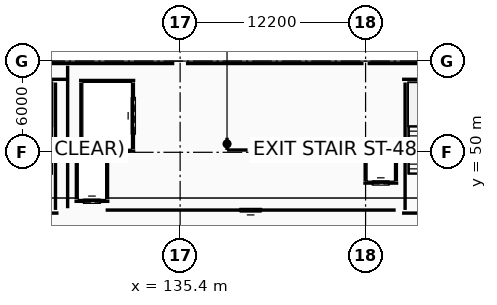
"""IFC4 building model, lengths in metres.
Left out: names, types, materials, properties, quantities, classifications, styles, units other than length and angle.
Written with IfcOpenShell. Run it as: python <this file> out.ifc"""

import sys

from ifc_helpers import new_model, si_unit, direction, frame, frame_2d, origin, origin_2d, place, context, subcontext, project, spatial, rectangle, i_section, extrude, element, fill, save


model = new_model("IFC4")
c1 = context("Model", 3, precision=1e-05, world=origin(), true_north=direction((0.0, 1.0)))
c2 = subcontext(c1, "Body", "Model", "MODEL_VIEW")
j1 = project(units=[si_unit("LENGTHUNIT", "METRE"), si_unit("PLANEANGLEUNIT", "RADIAN")], contexts=[c1])
p1 = place(None, origin())
s1 = spatial("IfcSite", under=j1, at=p1, CompositionType="ELEMENT")
p2 = place(p1, origin())
s2 = spatial("IfcBuilding", under=s1, at=p2, CompositionType="ELEMENT")
p3 = place(p2, frame((0.0, 0.0, 15.0)))
s3 = spatial("IfcBuildingStorey", under=s2, at=p3, CompositionType="ELEMENT", Elevation=15.0)
for number, where, z_axis, x_axis in (
    (1, (135.4, 50.0, 0.0), (0.0, 0.0, 1.0), (1.0, 0.0, 0.0)),
    (2, (135.4, 56.0, 0.0), (0.0, 0.0, 1.0), (1.0, 0.0, 0.0)),
):
    element("IfcColumn", number, at=place(p3, frame(where, z_axis=z_axis, x_axis=x_axis)), inside=s3, PredefinedType="COLUMN", context=c2, shape_type="SweptSolid", body=[
        extrude(rectangle(XDim=0.75, YDim=0.75, at=origin_2d()), origin(), (0.0, 0.0, 1.0), 4.8),
    ])
p4 = place(p3, frame((147.6, 56.0, 0.0), z_axis=(0.0, 0.0, 1.0), x_axis=(1.0, 0.0, 0.0)))
e3 = element("IfcColumn", 3, at=p4, inside=s3, PredefinedType="COLUMN", context=c2, shape_type="SweptSolid", body=[
    extrude(i_section(OverallWidth=0.25, OverallDepth=0.4, WebThickness=0.01, FlangeThickness=0.013, FilletRadius=0.014, at=origin_2d()), origin(), (0.0, 0.0, 1.0), 4.8),
])
p5 = place(p3, frame((126.783, 55.84, 0.0), z_axis=(0.0, 0.0, 1.0), x_axis=(1.0, 0.0, 0.0)))
e4 = element("IfcWall", 4, at=p5, inside=s3, PredefinedType="STANDARD", context=c2, shape_type="SweptSolid", body=[
    extrude(rectangle(XDim=8.234, YDim=0.28, at=frame_2d((4.117, 0.0))), origin(), (0.0, 0.0, 1.0), 4.075),
])
p6 = place(p5, frame((3.492, 0.0, 0.95)))
e5 = element("IfcOpeningElement", 5, at=p6, cuts=e4, PredefinedType="OPENING", context=c2, shape_type="SweptSolid", body=[
    extrude(rectangle(XDim=1.25, YDim=1.8, at=frame_2d((0.625, 0.9))), frame((0.0, 0.15, 0.0), z_axis=(0.0, -1.0, 0.0), x_axis=(1.0, 0.0, 0.0)), (0.0, 0.0, 1.0), 0.3),
])
p7 = place(p3, frame((135.783, 55.84, 0.0), z_axis=(0.0, 0.0, 1.0), x_axis=(1.0, 0.0, 0.0)))
e6 = element("IfcWall", 6, at=p7, inside=s3, PredefinedType="STANDARD", context=c2, shape_type="SweptSolid", body=[
    extrude(rectangle(XDim=11.684, YDim=0.28, at=frame_2d((5.842, 0.0))), origin(), (0.0, 0.0, 1.0), 3.925),
])
p8 = place(p7, frame((5.217, 0.0, 0.95)))
e7 = element("IfcOpeningElement", 7, at=p8, cuts=e6, PredefinedType="OPENING", context=c2, shape_type="SweptSolid", body=[
    extrude(rectangle(XDim=1.25, YDim=2.1, at=frame_2d((0.625, 1.05))), frame((0.0, 0.15, 0.0), z_axis=(0.0, -1.0, 0.0), x_axis=(1.0, 0.0, 0.0)), (0.0, 0.0, 1.0), 0.3),
])
p9 = place(p3, frame((147.733, 55.84, 0.0), z_axis=(0.0, 0.0, 1.0), x_axis=(1.0, 0.0, 0.0)))
e8 = element("IfcWall", 8, at=p9, inside=s3, PredefinedType="STANDARD", context=c2, shape_type="SweptSolid", body=[
    extrude(rectangle(XDim=11.943, YDim=0.28, at=frame_2d((5.972, 0.0))), origin(), (0.0, 0.0, 1.0), 3.985),
])
p10 = place(p9, frame((5.259, 0.0, 0.95)))
e9 = element("IfcOpeningElement", 9, at=p10, cuts=e8, PredefinedType="OPENING", context=c2, shape_type="SweptSolid", body=[
    extrude(rectangle(XDim=1.4, YDim=1.2, at=frame_2d((0.7, 0.6))), frame((0.0, 0.15, 0.0), z_axis=(0.0, -1.0, 0.0), x_axis=(1.0, 0.0, 0.0)), (0.0, 0.0, 1.0), 0.3),
])
p11 = place(p3, frame((119.0, 46.0, 0.0), z_axis=(0.0, 0.0, 1.0), x_axis=(1.0, 0.0, 0.0)))
e10 = element("IfcWall", 10, at=p11, inside=s3, PredefinedType="SHEAR", context=c2, shape_type="SweptSolid", body=[
    extrude(rectangle(XDim=8.4, YDim=0.4, at=frame_2d((4.2, 0.0))), origin(), (0.0, 0.0, 1.0), 4.55),
])
p12 = place(p11, frame((3.55, 0.0, 0.0)))
e11 = element("IfcOpeningElement", 11, at=p12, cuts=e10, PredefinedType="OPENING", context=c2, shape_type="SweptSolid", body=[
    extrude(rectangle(XDim=1.3, YDim=2.15, at=frame_2d((0.65, 1.075))), frame((0.0, 0.21, 0.0), z_axis=(0.0, -1.0, 0.0), x_axis=(1.0, 0.0, 0.0)), (0.0, 0.0, 1.0), 0.42),
])
p13 = place(p3, frame((127.896, 54.8, 0.0), z_axis=(0.0, 0.0, 1.0), x_axis=(-1.0, 0.0, 0.0)))
e12 = element("IfcWall", 12, at=p13, inside=s3, PredefinedType="SHEAR", context=c2, shape_type="SweptSolid", body=[
    extrude(rectangle(XDim=8.952, YDim=0.4, at=frame_2d((4.476, 0.0))), origin(), (0.0, 0.0, 1.0), 4.55),
])
p14 = place(p3, frame((127.2, 46.21, 0.0), z_axis=(0.0, 0.0, 1.0), x_axis=(0.0, 1.0, 0.0)))
e13 = element("IfcWall", 13, at=p14, inside=s3, PredefinedType="SHEAR", context=c2, shape_type="SweptSolid", body=[
    extrude(rectangle(XDim=8.38, YDim=0.4, at=frame_2d((4.19, 0.0))), origin(), (0.0, 0.0, 1.0), 4.55),
])
p15 = place(p3, frame((128.45, 46.775, 0.0), z_axis=(0.0, 0.0, 1.0), x_axis=(1.0, 0.0, 0.0)))
e14 = element("IfcWall", 14, at=p15, inside=s3, PredefinedType="STANDARD", context=c2, shape_type="SweptSolid", body=[
    extrude(rectangle(XDim=2.3, YDim=0.25, at=frame_2d((1.15, 0.0))), origin(), (0.0, 0.0, 1.0), 4.53),
])
p16 = place(p15, frame((0.6, 0.0, 0.0)))
e15 = element("IfcOpeningElement", 15, at=p16, cuts=e14, PredefinedType="OPENING", context=c2, shape_type="SweptSolid", body=[
    extrude(rectangle(XDim=1.1, YDim=2.15, at=frame_2d((0.55, 1.075))), frame((0.0, 0.135, 0.0), z_axis=(0.0, -1.0, 0.0), x_axis=(1.0, 0.0, 0.0)), (0.0, 0.0, 1.0), 0.27),
])
p17 = place(p3, frame((130.75, 49.625, 0.0), z_axis=(0.0, 0.0, 1.0), x_axis=(-1.0, 0.0, 0.0)))
e16 = element("IfcWall", 16, at=p17, inside=s3, PredefinedType="STANDARD", context=c2, shape_type="SweptSolid", body=[
    extrude(rectangle(XDim=2.3, YDim=0.25, at=frame_2d((1.15, 0.0))), origin(), (0.0, 0.0, 1.0), 4.53),
])
for number, where, z_axis, x_axis in (
    (17, (130.625, 46.91, 0.0), (0.0, 0.0, 1.0), (0.0, 1.0, 0.0)),
    (18, (128.575, 49.49, 0.0), (0.0, 0.0, 1.0), (0.0, -1.0, 0.0)),
):
    element("IfcWall", number, at=place(p3, frame(where, z_axis=z_axis, x_axis=x_axis)), inside=s3, PredefinedType="STANDARD", context=c2, shape_type="SweptSolid", body=[
        extrude(rectangle(XDim=2.58, YDim=0.25, at=frame_2d((1.29, 0.0))), origin(), (0.0, 0.0, 1.0), 4.53),
    ])
for number, where, z_axis, x_axis in (
    (19, (128.75, 50.075, 0.0), (0.0, 0.0, 1.0), (1.0, 0.0, 0.0)),
    (20, (132.45, 54.725, 0.0), (0.0, 0.0, 1.0), (-1.0, 0.0, 0.0)),
):
    element("IfcWall", number, at=place(p3, frame(where, z_axis=z_axis, x_axis=x_axis)), inside=s3, PredefinedType="STANDARD", context=c2, shape_type="SweptSolid", body=[
        extrude(rectangle(XDim=3.7, YDim=0.25, at=frame_2d((1.85, 0.0))), origin(), (0.0, 0.0, 1.0), 4.53),
    ])
p18 = place(p3, frame((132.325, 50.21, 0.0), z_axis=(0.0, 0.0, 1.0), x_axis=(0.0, 1.0, 0.0)))
e21 = element("IfcWall", 21, at=p18, inside=s3, PredefinedType="STANDARD", context=c2, shape_type="SweptSolid", body=[
    extrude(rectangle(XDim=4.38, YDim=0.25, at=frame_2d((2.19, 0.0))), origin(), (0.0, 0.0, 1.0), 4.53),
])
p19 = place(p18, frame((0.99, 0.0, 0.0)))
e22 = element("IfcOpeningElement", 22, at=p19, cuts=e21, PredefinedType="OPENING", context=c2, shape_type="SweptSolid", body=[
    extrude(rectangle(XDim=2.4, YDim=2.55, at=frame_2d((1.2, 1.275))), frame((0.0, 0.135, 0.0), z_axis=(0.0, -1.0, 0.0), x_axis=(1.0, 0.0, 0.0)), (0.0, 0.0, 1.0), 0.27),
])
p20 = place(p3, frame((128.875, 54.59, 0.0), z_axis=(0.0, 0.0, 1.0), x_axis=(0.0, -1.0, 0.0)))
e23 = element("IfcWall", 23, at=p20, inside=s3, PredefinedType="STANDARD", context=c2, shape_type="SweptSolid", body=[
    extrude(rectangle(XDim=4.38, YDim=0.25, at=frame_2d((2.19, 0.0))), origin(), (0.0, 0.0, 1.0), 4.53),
])
p21 = place(p3, frame((150.0, 46.0, 0.0), z_axis=(0.0, 0.0, 1.0), x_axis=(1.0, 0.0, 0.0)))
e24 = element("IfcWall", 24, at=p21, inside=s3, PredefinedType="SHEAR", context=c2, shape_type="SweptSolid", body=[
    extrude(rectangle(XDim=8.4, YDim=0.4, at=frame_2d((4.2, 0.0))), origin(), (0.0, 0.0, 1.0), 4.58),
])
p22 = place(p21, frame((3.55, 0.0, 0.0)))
e25 = element("IfcOpeningElement", 25, at=p22, cuts=e24, PredefinedType="OPENING", context=c2, shape_type="SweptSolid", body=[
    extrude(rectangle(XDim=1.3, YDim=2.15, at=frame_2d((0.65, 1.075))), frame((0.0, 0.21, 0.0), z_axis=(0.0, -1.0, 0.0), x_axis=(1.0, 0.0, 0.0)), (0.0, 0.0, 1.0), 0.42),
])
p23 = place(p3, frame((158.4, 54.8, 0.0), z_axis=(0.0, 0.0, 1.0), x_axis=(-1.0, 0.0, 0.0)))
e26 = element("IfcWall", 26, at=p23, inside=s3, PredefinedType="SHEAR", context=c2, shape_type="SweptSolid", body=[
    extrude(rectangle(XDim=8.4, YDim=0.4, at=frame_2d((4.2, 0.0))), origin(), (0.0, 0.0, 1.0), 4.58),
])
p24 = place(p3, frame((150.2, 54.59, 0.0), z_axis=(0.0, 0.0, 1.0), x_axis=(0.0, -1.0, 0.0)))
e27 = element("IfcWall", 27, at=p24, inside=s3, PredefinedType="SHEAR", context=c2, shape_type="SweptSolid", body=[
    extrude(rectangle(XDim=8.38, YDim=0.4, at=frame_2d((4.19, 0.0))), origin(), (0.0, 0.0, 1.0), 4.58),
])
p25 = place(p3, frame((147.45, 47.975, 0.0), z_axis=(0.0, 0.0, 1.0), x_axis=(1.0, 0.0, 0.0)))
e28 = element("IfcWall", 28, at=p25, inside=s3, PredefinedType="STANDARD", context=c2, shape_type="SweptSolid", body=[
    extrude(rectangle(XDim=2.3, YDim=0.25, at=frame_2d((1.15, 0.0))), origin(), (0.0, 0.0, 1.0), 4.57),
])
p26 = place(p25, frame((0.6, 0.0, 0.0)))
e29 = element("IfcOpeningElement", 29, at=p26, cuts=e28, PredefinedType="OPENING", context=c2, shape_type="SweptSolid", body=[
    extrude(rectangle(XDim=1.1, YDim=2.15, at=frame_2d((0.55, 1.075))), frame((0.0, 0.135, 0.0), z_axis=(0.0, -1.0, 0.0), x_axis=(1.0, 0.0, 0.0)), (0.0, 0.0, 1.0), 0.27),
])
p27 = place(p3, frame((149.75, 50.825, 0.0), z_axis=(0.0, 0.0, 1.0), x_axis=(-1.0, 0.0, 0.0)))
e30 = element("IfcWall", 30, at=p27, inside=s3, PredefinedType="STANDARD", context=c2, shape_type="SweptSolid", body=[
    extrude(rectangle(XDim=2.3, YDim=0.25, at=frame_2d((1.15, 0.0))), origin(), (0.0, 0.0, 1.0), 4.57),
])
for number, where, z_axis, x_axis in (
    (31, (149.625, 48.11, 0.0), (0.0, 0.0, 1.0), (0.0, 1.0, 0.0)),
    (32, (147.575, 50.69, 0.0), (0.0, 0.0, 1.0), (0.0, -1.0, 0.0)),
):
    element("IfcWall", number, at=place(p3, frame(where, z_axis=z_axis, x_axis=x_axis)), inside=s3, PredefinedType="STANDARD", context=c2, shape_type="SweptSolid", body=[
        extrude(rectangle(XDim=2.58, YDim=0.25, at=frame_2d((1.29, 0.0))), origin(), (0.0, 0.0, 1.0), 4.57),
    ])
p28 = place(p3, frame((149.58, 46.2, 0.0), z_axis=(0.0, 0.0, 1.0), x_axis=(-1.0, 0.0, 0.0)))
e33 = element("IfcWall", 33, at=p28, inside=s3, PredefinedType="PARTITIONING", context=c2, shape_type="SweptSolid", body=[
    extrude(rectangle(XDim=19.08, YDim=0.2, at=frame_2d((9.54, 0.0))), origin(), (0.0, 0.0, 1.0), 4.53),
])
p29 = place(p28, frame((8.84, 0.0, 0.0)))
e34 = element("IfcOpeningElement", 34, at=p29, cuts=e33, PredefinedType="OPENING", context=c2, shape_type="SweptSolid", body=[
    extrude(rectangle(XDim=1.4, YDim=2.15, at=frame_2d((0.7, 1.075))), frame((0.0, 0.11, 0.0), z_axis=(0.0, -1.0, 0.0), x_axis=(1.0, 0.0, 0.0)), (0.0, 0.0, 1.0), 0.22),
])
p30 = place(p3, frame((128.0, 46.32, 0.0), z_axis=(0.0, 0.0, 1.0), x_axis=(0.0, 1.0, 0.0)))
e35 = element("IfcWall", 35, at=p30, inside=s3, PredefinedType="PARTITIONING", context=c2, shape_type="SweptSolid", body=[
    extrude(rectangle(XDim=9.376, YDim=0.2, at=frame_2d((4.688, 0.0))), origin(), (0.0, 0.0, 1.0), 4.54),
])
p31 = place(p6, origin())
e36 = element("IfcWindow", 36, at=p31, inside=s3, PartitioningType="SINGLE_PANEL", PredefinedType="WINDOW", context=c2, shape_type="SweptSolid", body=[
    extrude(rectangle(XDim=1.25, YDim=1.8, at=frame_2d((0.625, 0.9))), frame((0.0, 0.03, 0.0), z_axis=(0.0, -1.0, 0.0), x_axis=(1.0, 0.0, 0.0)), (0.0, 0.0, 1.0), 0.06),
])
fill(e5, e36)
p32 = place(p8, origin())
e37 = element("IfcWindow", 37, at=p32, inside=s3, PartitioningType="SINGLE_PANEL", PredefinedType="WINDOW", context=c2, shape_type="SweptSolid", body=[
    extrude(rectangle(XDim=1.25, YDim=2.1, at=frame_2d((0.625, 1.05))), frame((0.0, 0.03, 0.0), z_axis=(0.0, -1.0, 0.0), x_axis=(1.0, 0.0, 0.0)), (0.0, 0.0, 1.0), 0.06),
])
fill(e7, e37)
p33 = place(p16, origin())
e38 = element("IfcDoor", 38, at=p33, inside=s3, OperationType="DOUBLE_DOOR_SLIDING", PredefinedType="DOOR", context=c2, shape_type="SweptSolid", body=[
    extrude(rectangle(XDim=1.1, YDim=2.15, at=frame_2d((0.55, 1.075))), frame((0.0, 0.025, 0.0), z_axis=(0.0, -1.0, 0.0), x_axis=(1.0, 0.0, 0.0)), (0.0, 0.0, 1.0), 0.05),
])
fill(e15, e38)
p34 = place(p19, origin())
e39 = element("IfcDoor", 39, at=p34, inside=s3, OperationType="DOUBLE_DOOR_SLIDING", PredefinedType="DOOR", context=c2, shape_type="SweptSolid", body=[
    extrude(rectangle(XDim=2.4, YDim=2.55, at=frame_2d((1.2, 1.275))), frame((0.0, 0.025, 0.0), z_axis=(0.0, -1.0, 0.0), x_axis=(1.0, 0.0, 0.0)), (0.0, 0.0, 1.0), 0.05),
])
fill(e22, e39)
p35 = place(p26, origin())
e40 = element("IfcDoor", 40, at=p35, inside=s3, OperationType="DOUBLE_DOOR_SLIDING", PredefinedType="DOOR", context=c2, shape_type="SweptSolid", body=[
    extrude(rectangle(XDim=1.1, YDim=2.15, at=frame_2d((0.55, 1.075))), frame((0.0, 0.025, 0.0), z_axis=(0.0, -1.0, 0.0), x_axis=(1.0, 0.0, 0.0)), (0.0, 0.0, 1.0), 0.05),
])
fill(e29, e40)
p36 = place(p29, origin())
e41 = element("IfcDoor", 41, at=p36, inside=s3, OperationType="SLIDING_TO_LEFT", PredefinedType="DOOR", context=c2, shape_type="SweptSolid", body=[
    extrude(rectangle(XDim=1.4, YDim=2.15, at=frame_2d((0.7, 1.075))), frame((0.0, 0.025, 0.0), z_axis=(0.0, -1.0, 0.0), x_axis=(1.0, 0.0, 0.0)), (0.0, 0.0, 1.0), 0.05),
])
fill(e34, e41)
save(model, sys.argv[1])
